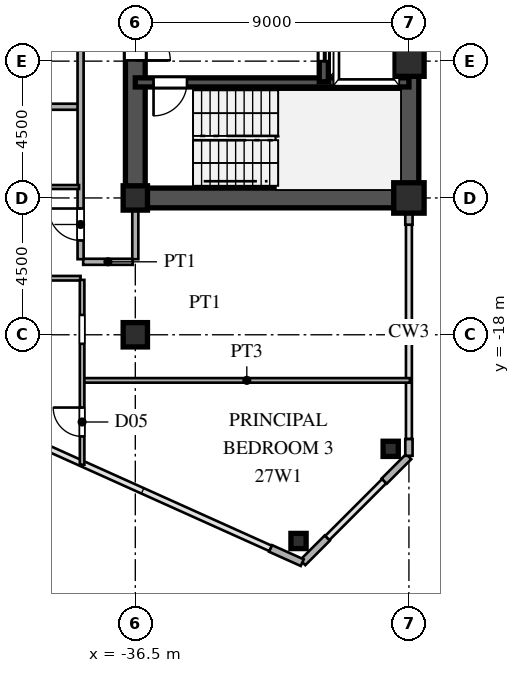
"""IFC4 building model, lengths in metres.
Left out: names, types, materials, properties, quantities, classifications, styles, units other than length and angle.
Written with IfcOpenShell. Run it as: python <this file> out.ifc"""

import sys

from ifc_helpers import new_model, si_unit, direction, frame, frame_2d, origin, origin_2d, place, context, subcontext, project, spatial, rectangle, hollow_rectangle, i_section, extrude, source, transform, mapped, element, fill, save


model = new_model("IFC4")
c1 = context("Model", 3, precision=1e-05, world=origin(), true_north=direction((0.0, 1.0)))
c2 = subcontext(c1, "Body", "Model", "MODEL_VIEW")
j1 = project(units=[si_unit("LENGTHUNIT", "METRE"), si_unit("PLANEANGLEUNIT", "RADIAN")], contexts=[c1])
p1 = place(None, origin())
s1 = spatial("IfcSite", under=j1, at=p1, CompositionType="ELEMENT")
p2 = place(p1, origin())
s2 = spatial("IfcBuilding", under=s1, at=p2, CompositionType="ELEMENT")
p3 = place(p2, frame((0.0, 0.0, 103.2)))
s3 = spatial("IfcBuildingStorey", under=s2, at=p3, CompositionType="ELEMENT", Elevation=103.2)
m1 = source(origin(), c2, "Body", "SweptSolid", [
    extrude(hollow_rectangle(XDim=1.0, YDim=1.0, WallThickness=0.042, at=origin_2d()), origin(), (0.0, 0.0, 1.0), 3.6),
])
for number, where, z_axis, x_axis in (
    (1, (-27.5, -13.5, 0.0), (0.0, 0.0, 1.0), (1.0, 0.0, 0.0)),
    (2, (-27.5, -9.0, 0.0), (0.0, 0.0, 1.0), (1.0, 0.0, 0.0)),
):
    element("IfcColumn", number, at=place(p3, frame(where, z_axis=z_axis, x_axis=x_axis)), inside=s3, PredefinedType="COLUMN", context=c2, shape_type="MappedRepresentation", body=[
        mapped(m1, transform((0.0, 0.0, 0.0), scale=1.0)),
    ])
m2 = source(origin(), c2, "Body", "SweptSolid", [
    extrude(i_section(OverallWidth=0.8, OverallDepth=0.8, WebThickness=0.032, FlangeThickness=0.05, at=origin_2d()), origin(), (0.0, 0.0, 1.0), 3.6),
])
for number, where, z_axis, x_axis in (
    (3, (-36.5, -18.0, 0.0), (0.0, 0.0, 1.0), (1.0, 0.0, 0.0)),
    (4, (-36.5, -13.5, 0.0), (0.0, 0.0, 1.0), (1.0, 0.0, 0.0)),
):
    element("IfcColumn", number, at=place(p3, frame(where, z_axis=z_axis, x_axis=x_axis)), inside=s3, PredefinedType="COLUMN", context=c2, shape_type="MappedRepresentation", body=[
        mapped(m2, transform((0.0, 0.0, 0.0), scale=1.0)),
    ])
m3 = source(origin(), c2, "Body", "SweptSolid", [
    extrude(hollow_rectangle(XDim=0.5, YDim=0.5, WallThickness=0.02, at=origin_2d()), origin(), (0.0, 0.0, 1.0), 3.6),
])
for number, where, z_axis, x_axis in (
    (5, (-28.1, -21.751, 0.0), (0.0, 0.0, 1.0), (1.0, 0.0, 0.0)),
    (6, (-31.131, -24.783, 0.0), (0.0, 0.0, 1.0), (1.0, 0.0, 0.0)),
):
    element("IfcColumn", number, at=place(p3, frame(where, z_axis=z_axis, x_axis=x_axis)), inside=s3, PredefinedType="COLUMN", context=c2, shape_type="MappedRepresentation", body=[
        mapped(m3, transform((0.0, 0.0, 0.0), scale=1.0)),
    ])
p4 = place(p3, frame((-27.5, -21.98, 0.0), z_axis=(0.0, 0.0, 1.0), x_axis=(0.0, 1.0, 0.0)))
e7 = element("IfcWall", 7, at=p4, inside=s3, PredefinedType="SOLIDWALL", context=c2, shape_type="SweptSolid", body=[
    extrude(rectangle(XDim=0.55, YDim=0.24, at=frame_2d((0.275, 0.0))), origin(), (0.0, 0.0, 1.0), 3.38),
])
p5 = place(p3, frame((-27.5, -14.38, 0.0), z_axis=(0.0, 0.0, 1.0), x_axis=(0.0, 1.0, 0.0)))
e8 = element("IfcWall", 8, at=p5, inside=s3, PredefinedType="SOLIDWALL", context=c2, shape_type="SweptSolid", body=[
    extrude(rectangle(XDim=0.55, YDim=0.24, at=frame_2d((0.275, 0.0))), origin(), (0.0, 0.0, 1.0), 2.88),
])
p6 = place(p3, frame((-32.049, -25.028, 0.0), z_axis=(0.0, 0.0, 1.0), x_axis=(0.911929519623, -0.410346866979, 0.0)))
e9 = element("IfcWall", 9, at=p6, inside=s3, PredefinedType="SOLIDWALL", context=c2, shape_type="SweptSolid", body=[
    extrude(rectangle(XDim=1.14, YDim=0.24, at=frame_2d((0.57, 0.0))), origin(), (0.0, 0.0, 1.0), 3.38),
])
for number, where, z_axis, x_axis in (
    (10, (-30.993, -25.493, 0.0), (0.0, 0.0, 1.0), (0.707, 0.707, 0.0)),
    (11, (-28.313, -22.813, 0.0), (0.0, 0.0, 1.0), (0.707, 0.707, 0.0)),
):
    element("IfcWall", number, at=place(p3, frame(where, z_axis=z_axis, x_axis=x_axis)), inside=s3, PredefinedType="SOLIDWALL", context=c2, shape_type="SweptSolid", body=[
        extrude(rectangle(XDim=1.14, YDim=0.24, at=frame_2d((0.57, 0.0))), origin(), (0.0, 0.0, 1.0), 3.38),
    ])
p7 = place(p3, frame((-27.5, -13.5, 0.0), z_axis=(0.0, 0.0, 1.0), x_axis=(0.0, 1.0, 0.0)))
e12 = element("IfcWall", 12, at=p7, inside=s3, PredefinedType="SHEAR", context=c2, shape_type="SweptSolid", body=[
    extrude(rectangle(XDim=12.2, YDim=0.65, at=frame_2d((6.1, 0.0))), origin(), (0.0, 0.0, 1.0), 3.38),
])
p8 = place(p3, frame((-36.5, -13.5, 0.0), z_axis=(0.0, 0.0, 1.0), x_axis=(1.0, 0.0, 0.0)))
e13 = element("IfcWall", 13, at=p8, inside=s3, PredefinedType="SHEAR", context=c2, shape_type="SweptSolid", body=[
    extrude(rectangle(XDim=9.0, YDim=0.65, at=frame_2d((4.5, 0.0))), origin(), (0.0, 0.0, 1.0), 3.38),
])
p9 = place(p3, frame((-36.5, -13.65, 0.0), z_axis=(0.0, 0.0, 1.0), x_axis=(0.0, 1.0, 0.0)))
e14 = element("IfcWall", 14, at=p9, inside=s3, PredefinedType="SHEAR", context=c2, shape_type="SweptSolid", body=[
    extrude(rectangle(XDim=7.15, YDim=0.65, at=frame_2d((3.575, 0.0))), origin(), (0.0, 0.0, 1.0), 3.38),
])
p10 = place(p9, frame((4.675, 0.0, 0.0)))
e15 = element("IfcOpeningElement", 15, at=p10, cuts=e14, PredefinedType="OPENING", context=c2, shape_type="SweptSolid", body=[
    extrude(rectangle(XDim=1.15, YDim=2.2, at=frame_2d((0.575, 1.1))), frame((0.0, 0.335, 0.0), z_axis=(0.0, -1.0, 0.0), x_axis=(1.0, 0.0, 0.0)), (0.0, 0.0, 1.0), 0.67),
])
p11 = place(p3, frame((-36.5, -9.7, 0.0), z_axis=(0.0, 0.0, 1.0), x_axis=(1.0, 0.0, 0.0)))
e16 = element("IfcWall", 16, at=p11, inside=s3, PredefinedType="SHEAR", context=c2, shape_type="SweptSolid", body=[
    extrude(rectangle(XDim=9.0, YDim=0.3, at=frame_2d((4.5, 0.0))), origin(), (0.0, 0.0, 1.0), 3.38),
])
p12 = place(p11, frame((0.6, 0.0, 0.0)))
e17 = element("IfcOpeningElement", 17, at=p12, cuts=e16, PredefinedType="OPENING", context=c2, shape_type="SweptSolid", body=[
    extrude(rectangle(XDim=1.1, YDim=2.2, at=frame_2d((0.55, 1.1))), frame((0.0, 0.16, 0.0), z_axis=(0.0, -1.0, 0.0), x_axis=(1.0, 0.0, 0.0)), (0.0, 0.0, 1.0), 0.32),
])
p13 = place(p3, frame((-30.3, -9.68, 0.0), z_axis=(0.0, 0.0, 1.0), x_axis=(0.0, 1.0, 0.0)))
e18 = element("IfcWall", 18, at=p13, inside=s3, PredefinedType="SHEAR", context=c2, shape_type="SweptSolid", body=[
    extrude(rectangle(XDim=2.56, YDim=0.3, at=frame_2d((1.28, 0.0))), origin(), (0.0, 0.0, 1.0), 3.38),
])
p14 = place(p13, frame((0.68, 0.0, 0.0)))
e19 = element("IfcOpeningElement", 19, at=p14, cuts=e18, PredefinedType="OPENING", context=c2, shape_type="SweptSolid", body=[
    extrude(rectangle(XDim=1.2, YDim=2.25, at=frame_2d((0.6, 1.125))), frame((0.0, 0.16, 0.0), z_axis=(0.0, -1.0, 0.0), x_axis=(1.0, 0.0, 0.0)), (0.0, 0.0, 1.0), 0.32),
])
p15 = place(p3, frame((-38.2, -19.5, 0.0), z_axis=(0.0, 0.0, 1.0), x_axis=(1.0, 0.0, 0.0)))
e20 = element("IfcWall", 20, at=p15, inside=s3, PredefinedType="PARTITIONING", context=c2, shape_type="SweptSolid", body=[
    extrude(rectangle(XDim=10.735, YDim=0.15, at=frame_2d((5.367, 0.0))), origin(), (0.0, 0.0, 1.0), 3.38),
])
p16 = place(p3, frame((-42.5, -16.14, 0.0), z_axis=(0.0, 0.0, 1.0), x_axis=(1.0, 0.0, 0.0)))
e21 = element("IfcWall", 21, at=p16, inside=s3, PredefinedType="PARTITIONING", context=c2, shape_type="SweptSolid", body=[
    extrude(rectangle(XDim=4.2, YDim=0.15, at=frame_2d((2.1, 0.0))), origin(), (0.0, 0.0, 1.0), 3.38),
])
p17 = place(p16, frame((1.625, 0.0, 0.0)))
e22 = element("IfcOpeningElement", 22, at=p17, cuts=e21, PredefinedType="OPENING", context=c2, shape_type="SweptSolid", body=[
    extrude(rectangle(XDim=0.95, YDim=2.15, at=frame_2d((0.475, 1.075))), frame((0.0, 0.085, 0.0), z_axis=(0.0, -1.0, 0.0), x_axis=(1.0, 0.0, 0.0)), (0.0, 0.0, 1.0), 0.17),
])
p18 = place(p3, frame((-38.215, -15.6, 0.0), z_axis=(0.0, 0.0, 1.0), x_axis=(1.0, 0.0, 0.0)))
e23 = element("IfcWall", 23, at=p18, inside=s3, PredefinedType="PARTITIONING", context=c2, shape_type="SweptSolid", body=[
    extrude(rectangle(XDim=1.63, YDim=0.2, at=frame_2d((0.815, 0.0))), origin(), (0.0, 0.0, 1.0), 3.38),
])
p19 = place(p3, frame((-42.5, -13.14, 0.0), z_axis=(0.0, 0.0, 1.0), x_axis=(1.0, 0.0, 0.0)))
e24 = element("IfcWall", 24, at=p19, inside=s3, PredefinedType="PARTITIONING", context=c2, shape_type="SweptSolid", body=[
    extrude(rectangle(XDim=4.15, YDim=0.13, at=frame_2d((2.075, 0.0))), origin(), (0.0, 0.0, 1.0), 3.38),
])
p20 = place(p19, frame((1.635, 0.0, 0.0)))
e25 = element("IfcOpeningElement", 25, at=p20, cuts=e24, PredefinedType="OPENING", context=c2, shape_type="SweptSolid", body=[
    extrude(rectangle(XDim=0.88, YDim=2.1, at=frame_2d((0.44, 1.05))), frame((0.0, 0.075, 0.0), z_axis=(0.0, -1.0, 0.0), x_axis=(1.0, 0.0, 0.0)), (0.0, 0.0, 1.0), 0.15),
])
p21 = place(p3, frame((-64.346, -10.5, 0.0), z_axis=(0.0, 0.0, 1.0), x_axis=(1.0, 0.0, 0.0)))
e26 = element("IfcWall", 26, at=p21, inside=s3, PredefinedType="PARTITIONING", context=c2, shape_type="SweptSolid", body=[
    extrude(rectangle(XDim=25.966, YDim=0.2, at=frame_2d((12.983, 0.0))), origin(), (0.0, 0.0, 1.0), 3.38),
])
p22 = place(p3, frame((-38.3, -15.515, 0.0), z_axis=(0.0, 0.0, 1.0), x_axis=(0.0, 1.0, 0.0)))
e27 = element("IfcWall", 27, at=p22, inside=s3, PredefinedType="PARTITIONING", context=c2, shape_type="SweptSolid", body=[
    extrude(rectangle(XDim=31.03, YDim=0.2, at=frame_2d((15.515, 0.0))), origin(), (0.0, 0.0, 1.0), 3.38),
])
p23 = place(p22, frame((0.617, 0.0, 0.0)))
e28 = element("IfcOpeningElement", 28, at=p23, cuts=e27, PredefinedType="OPENING", context=c2, shape_type="SweptSolid", body=[
    extrude(rectangle(XDim=1.05, YDim=2.25, at=frame_2d((0.525, 1.125))), frame((0.0, 0.11, 0.0), z_axis=(0.0, -1.0, 0.0), x_axis=(1.0, 0.0, 0.0)), (0.0, 0.0, 1.0), 0.22),
])
p24 = place(p22, frame((11.28, 0.0, 0.0)))
e29 = element("IfcOpeningElement", 29, at=p24, cuts=e27, PredefinedType="OPENING", context=c2, shape_type="SweptSolid", body=[
    extrude(rectangle(XDim=1.05, YDim=2.25, at=frame_2d((0.525, 1.125))), frame((0.0, 0.11, 0.0), z_axis=(0.0, -1.0, 0.0), x_axis=(1.0, 0.0, 0.0)), (0.0, 0.0, 1.0), 0.22),
])
p25 = place(p22, frame((24.567, 0.0, 0.0)))
e30 = element("IfcOpeningElement", 30, at=p25, cuts=e27, PredefinedType="OPENING", context=c2, shape_type="SweptSolid", body=[
    extrude(rectangle(XDim=1.05, YDim=2.25, at=frame_2d((0.525, 1.125))), frame((0.0, 0.11, 0.0), z_axis=(0.0, -1.0, 0.0), x_axis=(1.0, 0.0, 0.0)), (0.0, 0.0, 1.0), 0.22),
])
p26 = place(p3, frame((-38.25, -22.273, 0.0), z_axis=(0.0, 0.0, 1.0), x_axis=(0.0, 1.0, 0.0)))
e31 = element("IfcWall", 31, at=p26, inside=s3, PredefinedType="PARTITIONING", context=c2, shape_type="SweptSolid", body=[
    extrude(rectangle(XDim=6.078, YDim=0.15, at=frame_2d((3.039, 0.0))), origin(), (0.0, 0.0, 1.0), 3.38),
])
p27 = place(p26, frame((0.929, 0.0, 0.0)))
e32 = element("IfcOpeningElement", 32, at=p27, cuts=e31, PredefinedType="OPENING", context=c2, shape_type="SweptSolid", body=[
    extrude(rectangle(XDim=0.95, YDim=2.15, at=frame_2d((0.475, 1.075))), frame((0.0, 0.085, 0.0), z_axis=(0.0, -1.0, 0.0), x_axis=(1.0, 0.0, 0.0)), (0.0, 0.0, 1.0), 0.17),
])
p28 = place(p26, frame((3.976, 0.0, 0.0)))
e33 = element("IfcOpeningElement", 33, at=p28, cuts=e31, PredefinedType="OPENING", context=c2, shape_type="SweptSolid", body=[
    extrude(rectangle(XDim=0.95, YDim=2.15, at=frame_2d((0.475, 1.075))), frame((0.0, 0.085, 0.0), z_axis=(0.0, -1.0, 0.0), x_axis=(1.0, 0.0, 0.0)), (0.0, 0.0, 1.0), 0.17),
])
p29 = place(p3, frame((-36.5, -15.515, 0.0), z_axis=(0.0, 0.0, 1.0), x_axis=(0.0, 1.0, 0.0)))
e34 = element("IfcWall", 34, at=p29, inside=s3, PredefinedType="PARTITIONING", context=c2, shape_type="SweptSolid", body=[
    extrude(rectangle(XDim=1.685, YDim=0.2, at=frame_2d((0.842, 0.0))), origin(), (0.0, 0.0, 1.0), 2.68),
])
m4 = source(origin(), c2, "Body", "SweptSolid", [
    extrude(rectangle(XDim=1.15, YDim=2.2, at=frame_2d((0.575, 1.1))), frame((0.0, 0.025, 0.0), z_axis=(0.0, -1.0, 0.0), x_axis=(1.0, 0.0, 0.0)), (0.0, 0.0, 1.0), 0.05),
])
p30 = place(p10, frame((1.15, 0.0, 0.0), z_axis=(0.0, 0.0, 1.0), x_axis=(-1.0, 0.0, 0.0)))
e35 = element("IfcDoor", 35, at=p30, inside=s3, OperationType="SINGLE_SWING_LEFT", PredefinedType="DOOR", context=c2, shape_type="MappedRepresentation", body=[
    mapped(m4, transform((0.0, 0.0, 0.0), scale=1.0)),
])
fill(e15, e35)
m5 = source(origin(), c2, "Body", "SweptSolid", [
    extrude(rectangle(XDim=1.1, YDim=2.2, at=frame_2d((0.55, 1.1))), frame((0.0, 0.025, 0.0), z_axis=(0.0, -1.0, 0.0), x_axis=(1.0, 0.0, 0.0)), (0.0, 0.0, 1.0), 0.05),
])
p31 = place(p12, frame((1.1, 0.0, 0.0), z_axis=(0.0, 0.0, 1.0), x_axis=(-1.0, 0.0, 0.0)))
e36 = element("IfcDoor", 36, at=p31, inside=s3, OperationType="SINGLE_SWING_LEFT", PredefinedType="DOOR", context=c2, shape_type="MappedRepresentation", body=[
    mapped(m5, transform((0.0, 0.0, 0.0), scale=1.0)),
])
fill(e17, e36)
m6 = source(origin(), c2, "Body", "SweptSolid", [
    extrude(rectangle(XDim=1.2, YDim=2.25, at=frame_2d((0.6, 1.125))), frame((0.0, 0.025, 0.0), z_axis=(0.0, -1.0, 0.0), x_axis=(1.0, 0.0, 0.0)), (0.0, 0.0, 1.0), 0.05),
])
p32 = place(p14, origin())
e37 = element("IfcDoor", 37, at=p32, inside=s3, OperationType="DOUBLE_DOOR_SLIDING", PredefinedType="DOOR", context=c2, shape_type="MappedRepresentation", body=[
    mapped(m6, transform((0.0, 0.0, 0.0), scale=1.0)),
])
fill(e19, e37)
m7 = source(origin(), c2, "Body", "SweptSolid", [
    extrude(rectangle(XDim=1.05, YDim=2.25, at=frame_2d((0.525, 1.125))), frame((0.0, 0.025, 0.0), z_axis=(0.0, -1.0, 0.0), x_axis=(1.0, 0.0, 0.0)), (0.0, 0.0, 1.0), 0.05),
])
p33 = place(p23, origin())
e38 = element("IfcDoor", 38, at=p33, inside=s3, OperationType="SINGLE_SWING_RIGHT", PredefinedType="DOOR", context=c2, shape_type="MappedRepresentation", body=[
    mapped(m7, transform((0.0, 0.0, 0.0), scale=1.0)),
])
fill(e28, e38)
m8 = source(origin(), c2, "Body", "SweptSolid", [
    extrude(rectangle(XDim=0.95, YDim=2.15, at=frame_2d((0.475, 1.075))), frame((0.0, 0.025, 0.0), z_axis=(0.0, -1.0, 0.0), x_axis=(1.0, 0.0, 0.0)), (0.0, 0.0, 1.0), 0.05),
])
p34 = place(p27, origin())
e39 = element("IfcDoor", 39, at=p34, inside=s3, OperationType="SINGLE_SWING_RIGHT", PredefinedType="DOOR", context=c2, shape_type="MappedRepresentation", body=[
    mapped(m8, transform((0.0, 0.0, 0.0), scale=1.0)),
])
fill(e32, e39)
save(model, sys.argv[1])
